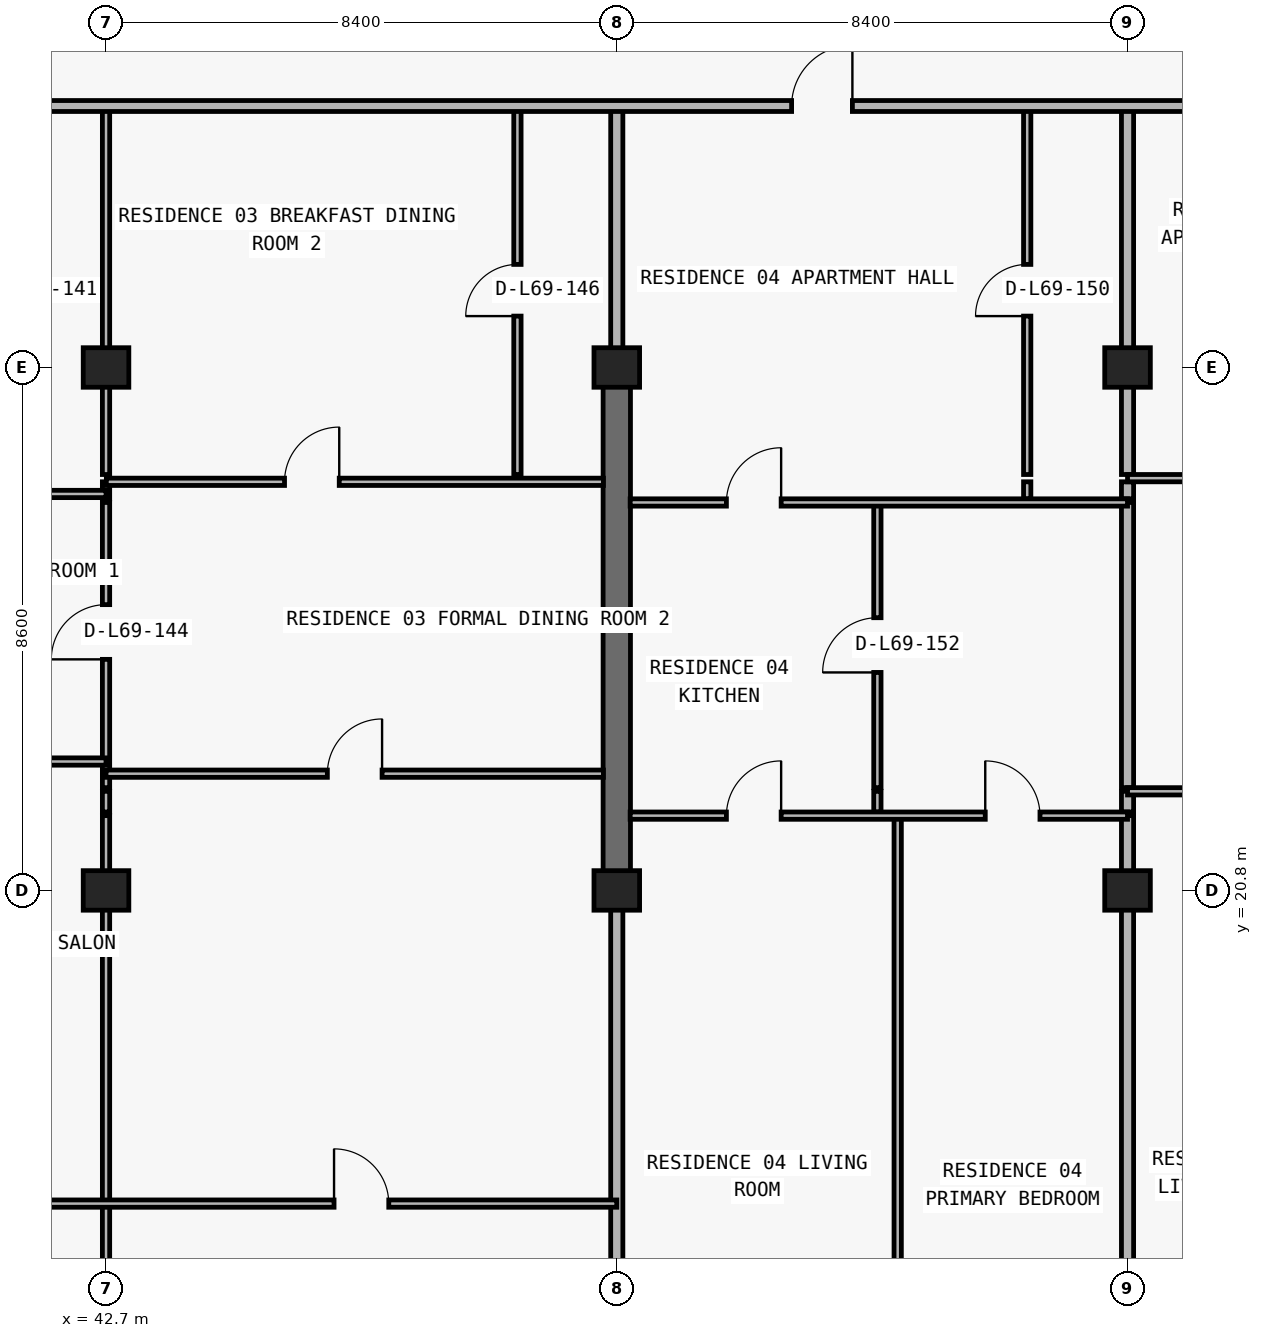
"""IFC4 building model, lengths in metres.
Left out: names, types, materials, properties, quantities, classifications, styles, units other than length and angle.
Written with IfcOpenShell. Run it as: python <this file> out.ifc"""

import sys

from ifc_helpers import new_model, si_unit, direction, frame, frame_2d, origin, origin_2d, place, context, subcontext, project, spatial, rectangle, extrude, element, fill, save


model = new_model("IFC4")
c1 = context("Model", 3, precision=1e-05, world=origin(), true_north=direction((0.0, 1.0)))
c2 = subcontext(c1, "Body", "Model", "MODEL_VIEW")
j1 = project(units=[si_unit("LENGTHUNIT", "METRE"), si_unit("PLANEANGLEUNIT", "RADIAN")], contexts=[c1])
p1 = place(None, origin())
s1 = spatial("IfcSite", under=j1, at=p1, CompositionType="ELEMENT")
p2 = place(p1, origin())
s2 = spatial("IfcBuilding", under=s1, at=p2, CompositionType="ELEMENT")
p3 = place(p2, frame((0.0, 0.0, 246.3)))
s3 = spatial("IfcBuildingStorey", under=s2, at=p3, CompositionType="ELEMENT", Elevation=246.3)
for number, where, z_axis, x_axis in (
    (1, (42.7, 20.8, 0.0), (0.0, 0.0, 1.0), (1.0, 0.0, 0.0)),
    (2, (51.1, 20.8, 0.0), (0.0, 0.0, 1.0), (1.0, 0.0, 0.0)),
    (3, (59.5, 20.8, 0.0), (0.0, 0.0, 1.0), (1.0, 0.0, 0.0)),
    (4, (42.7, 29.4, 0.0), (0.0, 0.0, 1.0), (1.0, 0.0, 0.0)),
    (5, (51.1, 29.4, 0.0), (0.0, 0.0, 1.0), (1.0, 0.0, 0.0)),
    (6, (59.5, 29.4, 0.0), (0.0, 0.0, 1.0), (1.0, 0.0, 0.0)),
):
    element("IfcColumn", number, at=place(p3, frame(where, z_axis=z_axis, x_axis=x_axis)), inside=s3, PredefinedType="COLUMN", context=c2, shape_type="SweptSolid", body=[
        extrude(rectangle(XDim=0.75, YDim=0.65, at=origin_2d()), origin(), (0.0, 0.0, 1.0), 3.05),
    ])
p4 = place(p3, frame((51.1, 20.8, 0.0), z_axis=(0.0, 0.0, 1.0), x_axis=(0.0, 1.0, 0.0)))
e7 = element("IfcWall", 7, at=p4, inside=s3, PredefinedType="SHEAR", context=c2, shape_type="SweptSolid", body=[
    extrude(rectangle(XDim=8.6, YDim=0.45, at=frame_2d((4.3, 0.0))), origin(), (0.0, 0.0, 1.0), 3.05),
])
p5 = place(p3, frame((42.7, 13.34, 0.0), z_axis=(0.0, 0.0, 1.0), x_axis=(0.0, 1.0, 0.0)))
e8 = element("IfcWall", 8, at=p5, inside=s3, PredefinedType="PARTITIONING", context=c2, shape_type="SweptSolid", body=[
    extrude(rectangle(XDim=8.69, YDim=0.12, at=frame_2d((4.345, 0.0))), origin(), (0.0, 0.0, 1.0), 2.263),
])
p6 = place(p3, frame((42.7, 22.09, 0.0), z_axis=(0.0, 0.0, 1.0), x_axis=(0.0, 1.0, 0.0)))
e9 = element("IfcWall", 9, at=p6, inside=s3, PredefinedType="PARTITIONING", context=c2, shape_type="SweptSolid", body=[
    extrude(rectangle(XDim=0.34, YDim=0.12, at=frame_2d((0.17, 0.0))), origin(), (0.0, 0.0, 1.0), 2.263),
])
p7 = place(p3, frame((42.7, 22.49, 0.0), z_axis=(0.0, 0.0, 1.0), x_axis=(0.0, 1.0, 0.0)))
e10 = element("IfcWall", 10, at=p7, inside=s3, PredefinedType="PARTITIONING", context=c2, shape_type="SweptSolid", body=[
    extrude(rectangle(XDim=4.69, YDim=0.12, at=frame_2d((2.345, 0.0))), origin(), (0.0, 0.0, 1.0), 2.263),
])
p8 = place(p7, frame((2.11, 0.0, 0.0)))
e11 = element("IfcOpeningElement", 11, at=p8, cuts=e10, PredefinedType="OPENING", context=c2, shape_type="SweptSolid", body=[
    extrude(rectangle(XDim=0.9, YDim=2.15, at=frame_2d((0.45, 1.075))), frame((0.0, 0.07, 0.0), z_axis=(0.0, -1.0, 0.0), x_axis=(1.0, 0.0, 0.0)), (0.0, 0.0, 1.0), 0.14),
])
p9 = place(p3, frame((42.7, 27.24, 0.0), z_axis=(0.0, 0.0, 1.0), x_axis=(0.0, 1.0, 0.0)))
e12 = element("IfcWall", 12, at=p9, inside=s3, PredefinedType="PARTITIONING", context=c2, shape_type="SweptSolid", body=[
    extrude(rectangle(XDim=0.28, YDim=0.12, at=frame_2d((0.14, 0.0))), origin(), (0.0, 0.0, 1.0), 2.263),
])
p10 = place(p3, frame((42.7, 27.64, 0.0), z_axis=(0.0, 0.0, 1.0), x_axis=(0.0, 1.0, 0.0)))
e13 = element("IfcWall", 13, at=p10, inside=s3, PredefinedType="PARTITIONING", context=c2, shape_type="SweptSolid", body=[
    extrude(rectangle(XDim=6.06, YDim=0.12, at=frame_2d((3.03, 0.0))), origin(), (0.0, 0.0, 1.0), 2.263),
])
p11 = place(p3, frame((49.466, 27.64, 0.0), z_axis=(0.0, 0.0, 1.0), x_axis=(0.0, 1.0, 0.0)))
e14 = element("IfcWall", 14, at=p11, inside=s3, PredefinedType="PARTITIONING", context=c2, shape_type="SweptSolid", body=[
    extrude(rectangle(XDim=6.06, YDim=0.12, at=frame_2d((3.03, 0.0))), origin(), (0.0, 0.0, 1.0), 3.05),
])
p12 = place(p11, frame((2.605, 0.0, 0.0)))
e15 = element("IfcOpeningElement", 15, at=p12, cuts=e14, PredefinedType="OPENING", context=c2, shape_type="SweptSolid", body=[
    extrude(rectangle(XDim=0.85, YDim=2.1, at=frame_2d((0.425, 1.05))), frame((0.0, 0.07, 0.0), z_axis=(0.0, -1.0, 0.0), x_axis=(1.0, 0.0, 0.0)), (0.0, 0.0, 1.0), 0.14),
])
p13 = place(p3, frame((51.1, 13.34, 0.0), z_axis=(0.0, 0.0, 1.0), x_axis=(0.0, 1.0, 0.0)))
e16 = element("IfcWall", 16, at=p13, inside=s3, PredefinedType="PARTITIONING", context=c2, shape_type="SweptSolid", body=[
    extrude(rectangle(XDim=7.455, YDim=0.2, at=frame_2d((3.728, 0.0))), origin(), (0.0, 0.0, 1.0), 2.263),
])
p14 = place(p3, frame((51.1, 29.405, 0.0), z_axis=(0.0, 0.0, 1.0), x_axis=(0.0, 1.0, 0.0)))
e17 = element("IfcWall", 17, at=p14, inside=s3, PredefinedType="PARTITIONING", context=c2, shape_type="SweptSolid", body=[
    extrude(rectangle(XDim=4.295, YDim=0.2, at=frame_2d((2.147, 0.0))), origin(), (0.0, 0.0, 1.0), 2.335),
])
p15 = place(p3, frame((55.386, 22.09, 0.0), z_axis=(0.0, 0.0, 1.0), x_axis=(0.0, 1.0, 0.0)))
e18 = element("IfcWall", 18, at=p15, inside=s3, PredefinedType="PARTITIONING", context=c2, shape_type="SweptSolid", body=[
    extrude(rectangle(XDim=0.34, YDim=0.12, at=frame_2d((0.17, 0.0))), origin(), (0.0, 0.0, 1.0), 2.578),
])
p16 = place(p3, frame((55.386, 22.49, 0.0), z_axis=(0.0, 0.0, 1.0), x_axis=(0.0, 1.0, 0.0)))
e19 = element("IfcWall", 19, at=p16, inside=s3, PredefinedType="PARTITIONING", context=c2, shape_type="SweptSolid", body=[
    extrude(rectangle(XDim=4.69, YDim=0.12, at=frame_2d((2.345, 0.0))), origin(), (0.0, 0.0, 1.0), 2.578),
])
p17 = place(p16, frame((1.895, 0.0, 0.0)))
e20 = element("IfcOpeningElement", 20, at=p17, cuts=e19, PredefinedType="OPENING", context=c2, shape_type="SweptSolid", body=[
    extrude(rectangle(XDim=0.9, YDim=2.15, at=frame_2d((0.45, 1.075))), frame((0.0, 0.07, 0.0), z_axis=(0.0, -1.0, 0.0), x_axis=(1.0, 0.0, 0.0)), (0.0, 0.0, 1.0), 0.14),
])
p18 = place(p3, frame((55.72, 13.34, 0.0), z_axis=(0.0, 0.0, 1.0), x_axis=(0.0, 1.0, 0.0)))
e21 = element("IfcWall", 21, at=p18, inside=s3, PredefinedType="PARTITIONING", context=c2, shape_type="SweptSolid", body=[
    extrude(rectangle(XDim=8.69, YDim=0.12, at=frame_2d((4.345, 0.0))), origin(), (0.0, 0.0, 1.0), 3.05),
])
p19 = place(p3, frame((57.85, 27.24, 0.0), z_axis=(0.0, 0.0, 1.0), x_axis=(0.0, 1.0, 0.0)))
e22 = element("IfcWall", 22, at=p19, inside=s3, PredefinedType="PARTITIONING", context=c2, shape_type="SweptSolid", body=[
    extrude(rectangle(XDim=0.28, YDim=0.12, at=frame_2d((0.14, 0.0))), origin(), (0.0, 0.0, 1.0), 3.05),
])
p20 = place(p3, frame((57.85, 27.64, 0.0), z_axis=(0.0, 0.0, 1.0), x_axis=(0.0, 1.0, 0.0)))
e23 = element("IfcWall", 23, at=p20, inside=s3, PredefinedType="PARTITIONING", context=c2, shape_type="SweptSolid", body=[
    extrude(rectangle(XDim=6.06, YDim=0.12, at=frame_2d((3.03, 0.0))), origin(), (0.0, 0.0, 1.0), 3.05),
])
p21 = place(p20, frame((2.605, 0.0, 0.0)))
e24 = element("IfcOpeningElement", 24, at=p21, cuts=e23, PredefinedType="OPENING", context=c2, shape_type="SweptSolid", body=[
    extrude(rectangle(XDim=0.85, YDim=2.1, at=frame_2d((0.425, 1.05))), frame((0.0, 0.07, 0.0), z_axis=(0.0, -1.0, 0.0), x_axis=(1.0, 0.0, 0.0)), (0.0, 0.0, 1.0), 0.14),
])
p22 = place(p3, frame((59.5, 13.34, 0.0), z_axis=(0.0, 0.0, 1.0), x_axis=(0.0, 1.0, 0.0)))
e25 = element("IfcWall", 25, at=p22, inside=s3, PredefinedType="PARTITIONING", context=c2, shape_type="SweptSolid", body=[
    extrude(rectangle(XDim=8.69, YDim=0.2, at=frame_2d((4.345, 0.0))), origin(), (0.0, 0.0, 1.0), 2.263),
])
p23 = place(p3, frame((59.5, 22.09, 0.0), z_axis=(0.0, 0.0, 1.0), x_axis=(0.0, 1.0, 0.0)))
e26 = element("IfcWall", 26, at=p23, inside=s3, PredefinedType="PARTITIONING", context=c2, shape_type="SweptSolid", body=[
    extrude(rectangle(XDim=0.34, YDim=0.2, at=frame_2d((0.17, 0.0))), origin(), (0.0, 0.0, 1.0), 2.263),
])
p24 = place(p3, frame((59.5, 22.49, 0.0), z_axis=(0.0, 0.0, 1.0), x_axis=(0.0, 1.0, 0.0)))
e27 = element("IfcWall", 27, at=p24, inside=s3, PredefinedType="PARTITIONING", context=c2, shape_type="SweptSolid", body=[
    extrude(rectangle(XDim=4.69, YDim=0.2, at=frame_2d((2.345, 0.0))), origin(), (0.0, 0.0, 1.0), 2.263),
])
p25 = place(p3, frame((59.5, 27.24, 0.0), z_axis=(0.0, 0.0, 1.0), x_axis=(0.0, 1.0, 0.0)))
e28 = element("IfcWall", 28, at=p25, inside=s3, PredefinedType="PARTITIONING", context=c2, shape_type="SweptSolid", body=[
    extrude(rectangle(XDim=0.28, YDim=0.2, at=frame_2d((0.14, 0.0))), origin(), (0.0, 0.0, 1.0), 2.263),
])
p26 = place(p3, frame((59.5, 27.64, 0.0), z_axis=(0.0, 0.0, 1.0), x_axis=(0.0, 1.0, 0.0)))
e29 = element("IfcWall", 29, at=p26, inside=s3, PredefinedType="PARTITIONING", context=c2, shape_type="SweptSolid", body=[
    extrude(rectangle(XDim=6.06, YDim=0.2, at=frame_2d((3.03, 0.0))), origin(), (0.0, 0.0, 1.0), 2.263),
])
p27 = place(p3, frame((41.2, 15.65, 0.0), z_axis=(0.0, 0.0, 1.0), x_axis=(1.0, 0.0, 0.0)))
e30 = element("IfcWall", 30, at=p27, inside=s3, PredefinedType="PARTITIONING", context=c2, shape_type="SweptSolid", body=[
    extrude(rectangle(XDim=9.9, YDim=0.12, at=frame_2d((4.95, 0.0))), origin(), (0.0, 0.0, 1.0), 3.05),
])
p28 = place(p27, frame((5.25, 0.0, 0.0)))
e31 = element("IfcOpeningElement", 31, at=p28, cuts=e30, PredefinedType="OPENING", context=c2, shape_type="SweptSolid", body=[
    extrude(rectangle(XDim=0.9, YDim=2.15, at=frame_2d((0.45, 1.075))), frame((0.0, 0.07, 0.0), z_axis=(0.0, -1.0, 0.0), x_axis=(1.0, 0.0, 0.0)), (0.0, 0.0, 1.0), 0.14),
])
p29 = place(p3, frame((51.32, 22.03, 0.0), z_axis=(0.0, 0.0, 1.0), x_axis=(1.0, 0.0, 0.0)))
e32 = element("IfcWall", 32, at=p29, inside=s3, PredefinedType="PARTITIONING", context=c2, shape_type="SweptSolid", body=[
    extrude(rectangle(XDim=8.18, YDim=0.12, at=frame_2d((4.09, 0.0))), origin(), (0.0, 0.0, 1.0), 3.05),
])
p30 = place(p29, frame((1.583, 0.0, 0.0)))
e33 = element("IfcOpeningElement", 33, at=p30, cuts=e32, PredefinedType="OPENING", context=c2, shape_type="SweptSolid", body=[
    extrude(rectangle(XDim=0.9, YDim=2.15, at=frame_2d((0.45, 1.075))), frame((0.0, 0.07, 0.0), z_axis=(0.0, -1.0, 0.0), x_axis=(1.0, 0.0, 0.0)), (0.0, 0.0, 1.0), 0.14),
])
p31 = place(p29, frame((5.84, 0.0, 0.0)))
e34 = element("IfcOpeningElement", 34, at=p31, cuts=e32, PredefinedType="OPENING", context=c2, shape_type="SweptSolid", body=[
    extrude(rectangle(XDim=0.9, YDim=2.15, at=frame_2d((0.45, 1.075))), frame((0.0, 0.07, 0.0), z_axis=(0.0, -1.0, 0.0), x_axis=(1.0, 0.0, 0.0)), (0.0, 0.0, 1.0), 0.14),
])
p32 = place(p3, frame((59.5, 22.43, 0.0), z_axis=(0.0, 0.0, 1.0), x_axis=(1.0, 0.0, 0.0)))
e35 = element("IfcWall", 35, at=p32, inside=s3, PredefinedType="PARTITIONING", context=c2, shape_type="SweptSolid", body=[
    extrude(rectangle(XDim=6.2, YDim=0.12, at=frame_2d((3.1, 0.0))), origin(), (0.0, 0.0, 1.0), 3.05),
])
p33 = place(p32, frame((1.1, 0.0, 0.0)))
e36 = element("IfcOpeningElement", 36, at=p33, cuts=e35, PredefinedType="OPENING", context=c2, shape_type="SweptSolid", body=[
    extrude(rectangle(XDim=0.9, YDim=2.15, at=frame_2d((0.45, 1.075))), frame((0.0, 0.07, 0.0), z_axis=(0.0, -1.0, 0.0), x_axis=(1.0, 0.0, 0.0)), (0.0, 0.0, 1.0), 0.14),
])
p34 = place(p32, frame((4.2, 0.0, 0.0)))
e37 = element("IfcOpeningElement", 37, at=p34, cuts=e35, PredefinedType="OPENING", context=c2, shape_type="SweptSolid", body=[
    extrude(rectangle(XDim=0.9, YDim=2.15, at=frame_2d((0.45, 1.075))), frame((0.0, 0.07, 0.0), z_axis=(0.0, -1.0, 0.0), x_axis=(1.0, 0.0, 0.0)), (0.0, 0.0, 1.0), 0.14),
])
p35 = place(p3, frame((42.7, 22.72, 0.0), z_axis=(0.0, 0.0, 1.0), x_axis=(1.0, 0.0, 0.0)))
e38 = element("IfcWall", 38, at=p35, inside=s3, PredefinedType="PARTITIONING", context=c2, shape_type="SweptSolid", body=[
    extrude(rectangle(XDim=8.18, YDim=0.12, at=frame_2d((4.09, 0.0))), origin(), (0.0, 0.0, 1.0), 3.05),
])
p36 = place(p35, frame((3.64, 0.0, 0.0)))
e39 = element("IfcOpeningElement", 39, at=p36, cuts=e38, PredefinedType="OPENING", context=c2, shape_type="SweptSolid", body=[
    extrude(rectangle(XDim=0.9, YDim=2.15, at=frame_2d((0.45, 1.075))), frame((0.0, 0.07, 0.0), z_axis=(0.0, -1.0, 0.0), x_axis=(1.0, 0.0, 0.0)), (0.0, 0.0, 1.0), 0.14),
])
p37 = place(p3, frame((41.2, 22.92, 0.0), z_axis=(0.0, 0.0, 1.0), x_axis=(1.0, 0.0, 0.0)))
e40 = element("IfcWall", 40, at=p37, inside=s3, PredefinedType="PARTITIONING", context=c2, shape_type="SweptSolid", body=[
    extrude(rectangle(XDim=1.5, YDim=0.12, at=frame_2d((0.75, 0.0))), origin(), (0.0, 0.0, 1.0), 3.05),
])
p38 = place(p3, frame((51.32, 27.18, 0.0), z_axis=(0.0, 0.0, 1.0), x_axis=(1.0, 0.0, 0.0)))
e41 = element("IfcWall", 41, at=p38, inside=s3, PredefinedType="PARTITIONING", context=c2, shape_type="SweptSolid", body=[
    extrude(rectangle(XDim=8.18, YDim=0.12, at=frame_2d((4.09, 0.0))), origin(), (0.0, 0.0, 1.0), 3.05),
])
p39 = place(p38, frame((1.583, 0.0, 0.0)))
e42 = element("IfcOpeningElement", 42, at=p39, cuts=e41, PredefinedType="OPENING", context=c2, shape_type="SweptSolid", body=[
    extrude(rectangle(XDim=0.9, YDim=2.15, at=frame_2d((0.45, 1.075))), frame((0.0, 0.07, 0.0), z_axis=(0.0, -1.0, 0.0), x_axis=(1.0, 0.0, 0.0)), (0.0, 0.0, 1.0), 0.14),
])
p40 = place(p3, frame((41.2, 27.32, 0.0), z_axis=(0.0, 0.0, 1.0), x_axis=(1.0, 0.0, 0.0)))
e43 = element("IfcWall", 43, at=p40, inside=s3, PredefinedType="PARTITIONING", context=c2, shape_type="SweptSolid", body=[
    extrude(rectangle(XDim=1.5, YDim=0.12, at=frame_2d((0.75, 0.0))), origin(), (0.0, 0.0, 1.0), 3.05),
])
p41 = place(p3, frame((42.705, 27.52, 0.0), z_axis=(0.0, 0.0, 1.0), x_axis=(1.0, 0.0, 0.0)))
e44 = element("IfcWall", 44, at=p41, inside=s3, PredefinedType="PARTITIONING", context=c2, shape_type="SweptSolid", body=[
    extrude(rectangle(XDim=8.175, YDim=0.12, at=frame_2d((4.087, 0.0))), origin(), (0.0, 0.0, 1.0), 3.05),
])
p42 = place(p41, frame((2.93, 0.0, 0.0)))
e45 = element("IfcOpeningElement", 45, at=p42, cuts=e44, PredefinedType="OPENING", context=c2, shape_type="SweptSolid", body=[
    extrude(rectangle(XDim=0.9, YDim=2.15, at=frame_2d((0.45, 1.075))), frame((0.0, 0.07, 0.0), z_axis=(0.0, -1.0, 0.0), x_axis=(1.0, 0.0, 0.0)), (0.0, 0.0, 1.0), 0.14),
])
p43 = place(p3, frame((59.5, 27.58, 0.0), z_axis=(0.0, 0.0, 1.0), x_axis=(1.0, 0.0, 0.0)))
e46 = element("IfcWall", 46, at=p43, inside=s3, PredefinedType="PARTITIONING", context=c2, shape_type="SweptSolid", body=[
    extrude(rectangle(XDim=6.2, YDim=0.12, at=frame_2d((3.1, 0.0))), origin(), (0.0, 0.0, 1.0), 3.05),
])
p44 = place(p43, frame((1.809, 0.0, 0.0)))
e47 = element("IfcOpeningElement", 47, at=p44, cuts=e46, PredefinedType="OPENING", context=c2, shape_type="SweptSolid", body=[
    extrude(rectangle(XDim=0.9, YDim=2.15, at=frame_2d((0.45, 1.075))), frame((0.0, 0.07, 0.0), z_axis=(0.0, -1.0, 0.0), x_axis=(1.0, 0.0, 0.0)), (0.0, 0.0, 1.0), 0.14),
])
p45 = place(p3, frame((41.2, 33.7, 0.0), z_axis=(0.0, 0.0, 1.0), x_axis=(1.0, 0.0, 0.0)))
e48 = element("IfcWall", 48, at=p45, inside=s3, PredefinedType="PARTITIONING", context=c2, shape_type="SweptSolid", body=[
    extrude(rectangle(XDim=24.5, YDim=0.18, at=frame_2d((12.25, 0.0))), origin(), (0.0, 0.0, 1.0), 3.05),
])
p46 = place(p45, frame((12.775, 0.0, 0.0)))
e49 = element("IfcOpeningElement", 49, at=p46, cuts=e48, PredefinedType="OPENING", context=c2, shape_type="SweptSolid", body=[
    extrude(rectangle(XDim=1.0, YDim=2.2, at=frame_2d((0.5, 1.1))), frame((0.0, 0.1, 0.0), z_axis=(0.0, -1.0, 0.0), x_axis=(1.0, 0.0, 0.0)), (0.0, 0.0, 1.0), 0.2),
])
p47 = place(p45, frame((20.059, 0.0, 0.0)))
e50 = element("IfcOpeningElement", 50, at=p47, cuts=e48, PredefinedType="OPENING", context=c2, shape_type="SweptSolid", body=[
    extrude(rectangle(XDim=1.0, YDim=2.2, at=frame_2d((0.5, 1.1))), frame((0.0, 0.1, 0.0), z_axis=(0.0, -1.0, 0.0), x_axis=(1.0, 0.0, 0.0)), (0.0, 0.0, 1.0), 0.2),
])
p48 = place(p8, origin())
e51 = element("IfcDoor", 51, at=p48, inside=s3, OperationType="SINGLE_SWING_LEFT", PredefinedType="DOOR", context=c2, shape_type="SweptSolid", body=[
    extrude(rectangle(XDim=0.9, YDim=2.15, at=frame_2d((0.45, 1.075))), frame((0.0, 0.025, 0.0), z_axis=(0.0, -1.0, 0.0), x_axis=(1.0, 0.0, 0.0)), (0.0, 0.0, 1.0), 0.05),
])
fill(e11, e51)
p49 = place(p42, origin())
e52 = element("IfcDoor", 52, at=p49, inside=s3, OperationType="SINGLE_SWING_RIGHT", PredefinedType="DOOR", context=c2, shape_type="SweptSolid", body=[
    extrude(rectangle(XDim=0.9, YDim=2.15, at=frame_2d((0.45, 1.075))), frame((0.0, 0.025, 0.0), z_axis=(0.0, -1.0, 0.0), x_axis=(1.0, 0.0, 0.0)), (0.0, 0.0, 1.0), 0.05),
])
fill(e45, e52)
p50 = place(p12, origin())
e53 = element("IfcDoor", 53, at=p50, inside=s3, OperationType="SINGLE_SWING_LEFT", PredefinedType="DOOR", context=c2, shape_type="SweptSolid", body=[
    extrude(rectangle(XDim=0.85, YDim=2.1, at=frame_2d((0.425, 1.05))), frame((0.0, 0.025, 0.0), z_axis=(0.0, -1.0, 0.0), x_axis=(1.0, 0.0, 0.0)), (0.0, 0.0, 1.0), 0.05),
])
fill(e15, e53)
p51 = place(p36, origin())
e54 = element("IfcDoor", 54, at=p51, inside=s3, OperationType="SINGLE_SWING_RIGHT", PredefinedType="DOOR", context=c2, shape_type="SweptSolid", body=[
    extrude(rectangle(XDim=0.9, YDim=2.15, at=frame_2d((0.45, 1.075))), frame((0.0, 0.025, 0.0), z_axis=(0.0, -1.0, 0.0), x_axis=(1.0, 0.0, 0.0)), (0.0, 0.0, 1.0), 0.05),
])
fill(e39, e54)
p52 = place(p28, origin())
e55 = element("IfcDoor", 55, at=p52, inside=s3, OperationType="SINGLE_SWING_LEFT", PredefinedType="DOOR", context=c2, shape_type="SweptSolid", body=[
    extrude(rectangle(XDim=0.9, YDim=2.15, at=frame_2d((0.45, 1.075))), frame((0.0, 0.025, 0.0), z_axis=(0.0, -1.0, 0.0), x_axis=(1.0, 0.0, 0.0)), (0.0, 0.0, 1.0), 0.05),
])
fill(e31, e55)
p53 = place(p46, origin())
e56 = element("IfcDoor", 56, at=p53, inside=s3, OperationType="SINGLE_SWING_RIGHT", PredefinedType="DOOR", context=c2, shape_type="SweptSolid", body=[
    extrude(rectangle(XDim=1.0, YDim=2.2, at=frame_2d((0.5, 1.1))), frame((0.0, 0.025, 0.0), z_axis=(0.0, -1.0, 0.0), x_axis=(1.0, 0.0, 0.0)), (0.0, 0.0, 1.0), 0.05),
])
fill(e49, e56)
p54 = place(p21, origin())
e57 = element("IfcDoor", 57, at=p54, inside=s3, OperationType="SINGLE_SWING_LEFT", PredefinedType="DOOR", context=c2, shape_type="SweptSolid", body=[
    extrude(rectangle(XDim=0.85, YDim=2.1, at=frame_2d((0.425, 1.05))), frame((0.0, 0.025, 0.0), z_axis=(0.0, -1.0, 0.0), x_axis=(1.0, 0.0, 0.0)), (0.0, 0.0, 1.0), 0.05),
])
fill(e24, e57)
p55 = place(p39, origin())
e58 = element("IfcDoor", 58, at=p55, inside=s3, OperationType="SINGLE_SWING_RIGHT", PredefinedType="DOOR", context=c2, shape_type="SweptSolid", body=[
    extrude(rectangle(XDim=0.9, YDim=2.15, at=frame_2d((0.45, 1.075))), frame((0.0, 0.025, 0.0), z_axis=(0.0, -1.0, 0.0), x_axis=(1.0, 0.0, 0.0)), (0.0, 0.0, 1.0), 0.05),
])
fill(e42, e58)
p56 = place(p17, origin())
e59 = element("IfcDoor", 59, at=p56, inside=s3, OperationType="SINGLE_SWING_LEFT", PredefinedType="DOOR", context=c2, shape_type="SweptSolid", body=[
    extrude(rectangle(XDim=0.9, YDim=2.15, at=frame_2d((0.45, 1.075))), frame((0.0, 0.025, 0.0), z_axis=(0.0, -1.0, 0.0), x_axis=(1.0, 0.0, 0.0)), (0.0, 0.0, 1.0), 0.05),
])
fill(e20, e59)
p57 = place(p30, origin())
e60 = element("IfcDoor", 60, at=p57, inside=s3, OperationType="SINGLE_SWING_RIGHT", PredefinedType="DOOR", context=c2, shape_type="SweptSolid", body=[
    extrude(rectangle(XDim=0.9, YDim=2.15, at=frame_2d((0.45, 1.075))), frame((0.0, 0.025, 0.0), z_axis=(0.0, -1.0, 0.0), x_axis=(1.0, 0.0, 0.0)), (0.0, 0.0, 1.0), 0.05),
])
fill(e33, e60)
p58 = place(p31, origin())
e61 = element("IfcDoor", 61, at=p58, inside=s3, OperationType="SINGLE_SWING_LEFT", PredefinedType="DOOR", context=c2, shape_type="SweptSolid", body=[
    extrude(rectangle(XDim=0.9, YDim=2.15, at=frame_2d((0.45, 1.075))), frame((0.0, 0.025, 0.0), z_axis=(0.0, -1.0, 0.0), x_axis=(1.0, 0.0, 0.0)), (0.0, 0.0, 1.0), 0.05),
])
fill(e34, e61)
save(model, sys.argv[1])
